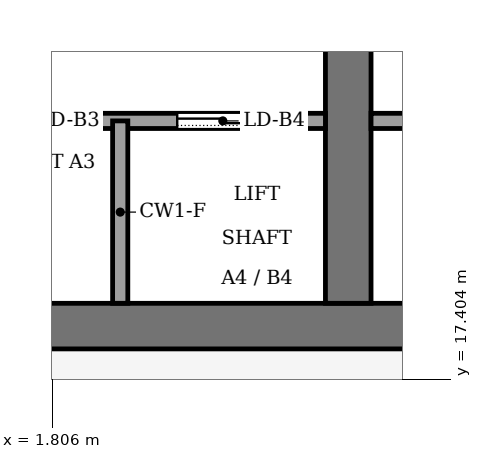
"""IFC4 building model, lengths in metres.
Left out: names, types, materials, properties, quantities, classifications, styles, units other than length and angle.
Written with IfcOpenShell. Run it as: python <this file> out.ifc"""

import sys

from ifc_helpers import new_model, si_unit, direction, frame, frame_2d, origin, place, context, subcontext, project, spatial, rectangle, extrude, element, fill, save


model = new_model("IFC4")
c1 = context("Model", 3, precision=1e-05, world=origin(), true_north=direction((0.0, 1.0)))
c2 = subcontext(c1, "Body", "Model", "MODEL_VIEW")
j1 = project(units=[si_unit("LENGTHUNIT", "METRE"), si_unit("PLANEANGLEUNIT", "RADIAN")], contexts=[c1])
p1 = place(None, origin())
s1 = spatial("IfcSite", under=j1, at=p1, CompositionType="ELEMENT")
p2 = place(p1, origin())
s2 = spatial("IfcBuilding", under=s1, at=p2, CompositionType="ELEMENT")
p3 = place(p2, frame((0.0, 0.0, 298.0)))
s3 = spatial("IfcBuildingStorey", under=s2, at=p3, CompositionType="ELEMENT", Elevation=298.0)
p4 = place(p3, frame((-13.2, 18.1, -0.13), z_axis=(0.0, 0.0, 1.0), x_axis=(1.0, 0.0, 0.0)))
e1 = element("IfcWall", 1, at=p4, inside=s3, PredefinedType="SHEAR", context=c2, shape_type="SweptSolid", body=[
    extrude(rectangle(XDim=26.4, YDim=0.6, at=frame_2d((13.2, 0.0))), origin(), (0.0, 0.0, 1.0), 4.0),
])
p5 = place(p3, frame((5.7, 18.4, -0.13), z_axis=(0.0, 0.0, 1.0), x_axis=(0.0, 1.0, 0.0)))
e2 = element("IfcWall", 2, at=p5, inside=s3, PredefinedType="SHEAR", context=c2, shape_type="SweptSolid", body=[
    extrude(rectangle(XDim=19.2, YDim=0.6, at=frame_2d((9.6, 0.0))), origin(), (0.0, 0.0, 1.0), 4.0),
])
p6 = place(p5, frame((8.35, 0.0, 0.13)))
e3 = element("IfcOpeningElement", 3, at=p6, cuts=e2, PredefinedType="OPENING", context=c2, shape_type="SweptSolid", body=[
    extrude(rectangle(XDim=0.9, YDim=2.1, at=frame_2d((0.45, 1.05))), frame((0.0, 0.31, 0.0), z_axis=(0.0, -1.0, 0.0), x_axis=(1.0, 0.0, 0.0)), (0.0, 0.0, 1.0), 0.62),
])
p7 = place(p5, frame((13.3, 0.0, 0.13)))
e4 = element("IfcOpeningElement", 4, at=p7, cuts=e2, PredefinedType="OPENING", context=c2, shape_type="SweptSolid", body=[
    extrude(rectangle(XDim=2.4, YDim=2.4, at=frame_2d((1.2, 1.2))), frame((0.0, 0.31, 0.0), z_axis=(0.0, -1.0, 0.0), x_axis=(1.0, 0.0, 0.0)), (0.0, 0.0, 1.0), 0.62),
])
p8 = place(p3, frame((-5.4, 20.8, 0.0), z_axis=(0.0, 0.0, 1.0), x_axis=(1.0, 0.0, 0.0)))
e5 = element("IfcWall", 5, at=p8, inside=s3, PredefinedType="PARTITIONING", context=c2, shape_type="SweptSolid", body=[
    extrude(rectangle(XDim=10.8, YDim=0.2, at=frame_2d((5.4, 0.0))), origin(), (0.0, 0.0, 1.0), 3.87),
])
p9 = place(p8, frame((0.75, 0.0, 0.0)))
e6 = element("IfcOpeningElement", 6, at=p9, cuts=e5, PredefinedType="OPENING", context=c2, shape_type="SweptSolid", body=[
    extrude(rectangle(XDim=1.2, YDim=2.2, at=frame_2d((0.6, 1.1))), frame((0.0, 0.11, 0.0), z_axis=(0.0, -1.0, 0.0), x_axis=(1.0, 0.0, 0.0)), (0.0, 0.0, 1.0), 0.22),
])
p10 = place(p8, frame((3.45, 0.0, 0.0)))
e7 = element("IfcOpeningElement", 7, at=p10, cuts=e5, PredefinedType="OPENING", context=c2, shape_type="SweptSolid", body=[
    extrude(rectangle(XDim=1.2, YDim=2.2, at=frame_2d((0.6, 1.1))), frame((0.0, 0.11, 0.0), z_axis=(0.0, -1.0, 0.0), x_axis=(1.0, 0.0, 0.0)), (0.0, 0.0, 1.0), 0.22),
])
p11 = place(p8, frame((6.15, 0.0, 0.0)))
e8 = element("IfcOpeningElement", 8, at=p11, cuts=e5, PredefinedType="OPENING", context=c2, shape_type="SweptSolid", body=[
    extrude(rectangle(XDim=1.2, YDim=2.2, at=frame_2d((0.6, 1.1))), frame((0.0, 0.11, 0.0), z_axis=(0.0, -1.0, 0.0), x_axis=(1.0, 0.0, 0.0)), (0.0, 0.0, 1.0), 0.22),
])
p12 = place(p8, frame((8.85, 0.0, 0.0)))
e9 = element("IfcOpeningElement", 9, at=p12, cuts=e5, PredefinedType="OPENING", context=c2, shape_type="SweptSolid", body=[
    extrude(rectangle(XDim=1.2, YDim=2.2, at=frame_2d((0.6, 1.1))), frame((0.0, 0.11, 0.0), z_axis=(0.0, -1.0, 0.0), x_axis=(1.0, 0.0, 0.0)), (0.0, 0.0, 1.0), 0.22),
])
p13 = place(p3, frame((6.0, 20.8, 0.0), z_axis=(0.0, 0.0, 1.0), x_axis=(1.0, 0.0, 0.0)))
e10 = element("IfcWall", 10, at=p13, inside=s3, PredefinedType="PARTITIONING", context=c2, shape_type="SweptSolid", body=[
    extrude(rectangle(XDim=6.6, YDim=0.2, at=frame_2d((3.3, 0.0))), origin(), (0.0, 0.0, 1.0), 3.87),
])
p14 = place(p13, frame((2.8, 0.0, 0.0)))
e11 = element("IfcOpeningElement", 11, at=p14, cuts=e10, PredefinedType="OPENING", context=c2, shape_type="SweptSolid", body=[
    extrude(rectangle(XDim=1.0, YDim=2.1, at=frame_2d((0.5, 1.05))), frame((0.0, 0.11, 0.0), z_axis=(0.0, -1.0, 0.0), x_axis=(1.0, 0.0, 0.0)), (0.0, 0.0, 1.0), 0.22),
])
p15 = place(p3, frame((2.7, 18.4, 0.0), z_axis=(0.0, 0.0, 1.0), x_axis=(0.0, 1.0, 0.0)))
e12 = element("IfcWall", 12, at=p15, inside=s3, PredefinedType="PARTITIONING", context=c2, shape_type="SweptSolid", body=[
    extrude(rectangle(XDim=2.4, YDim=0.2, at=frame_2d((1.2, 0.0))), origin(), (0.0, 0.0, 1.0), 3.87),
])
p16 = place(p11, origin())
e13 = element("IfcDoor", 13, at=p16, inside=s3, OperationType="SLIDING_TO_LEFT", PredefinedType="DOOR", context=c2, shape_type="SweptSolid", body=[
    extrude(rectangle(XDim=1.2, YDim=2.2, at=frame_2d((0.6, 1.1))), frame((0.0, 0.025, 0.0), z_axis=(0.0, -1.0, 0.0), x_axis=(1.0, 0.0, 0.0)), (0.0, 0.0, 1.0), 0.05),
])
fill(e8, e13)
p17 = place(p12, origin())
e14 = element("IfcDoor", 14, at=p17, inside=s3, OperationType="SLIDING_TO_LEFT", PredefinedType="DOOR", context=c2, shape_type="SweptSolid", body=[
    extrude(rectangle(XDim=1.2, YDim=2.2, at=frame_2d((0.6, 1.1))), frame((0.0, 0.025, 0.0), z_axis=(0.0, -1.0, 0.0), x_axis=(1.0, 0.0, 0.0)), (0.0, 0.0, 1.0), 0.05),
])
fill(e9, e14)
save(model, sys.argv[1])
